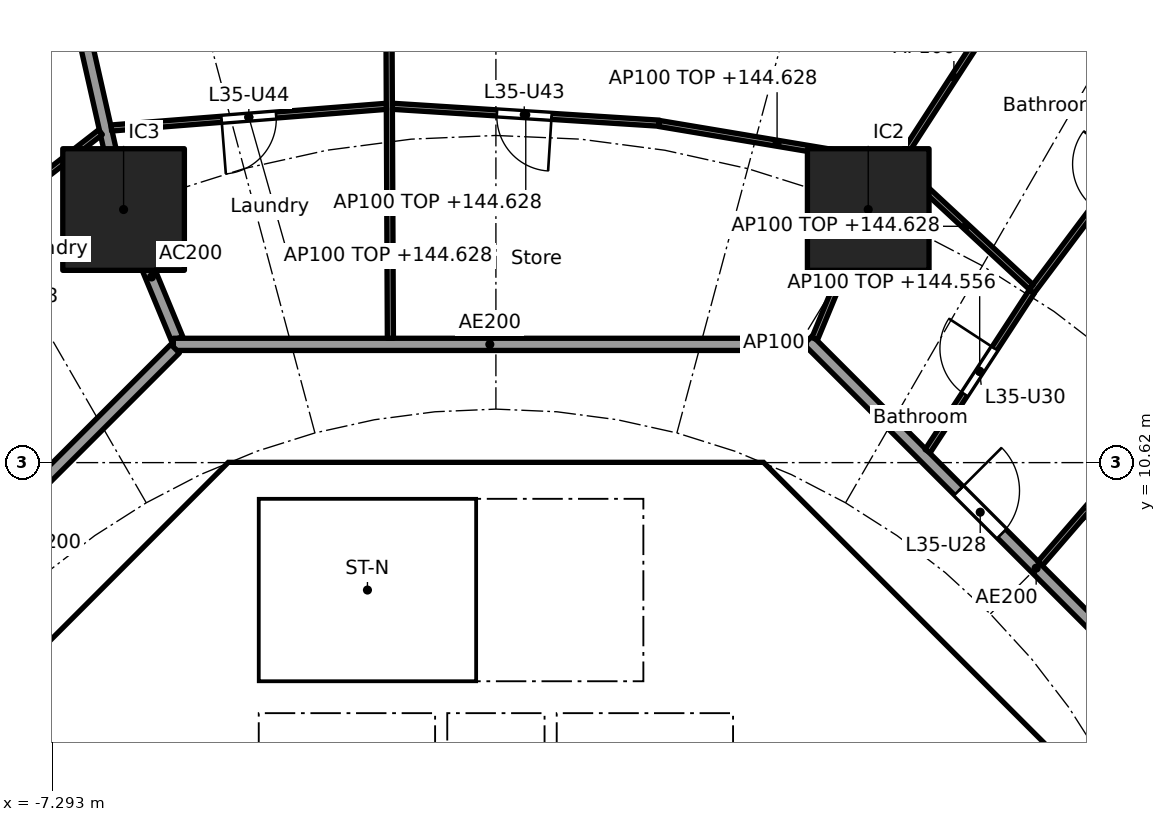
"""IFC4 building model, lengths in metres.
Left out: names, types, materials, properties, quantities, classifications, styles, units other than length and angle.
Written with IfcOpenShell. Run it as: python <this file> out.ifc"""

import sys

from ifc_helpers import new_model, si_unit, direction, frame, frame_2d, origin, origin_2d, place, context, subcontext, project, spatial, polyline, rectangle, outline, extrude, element, fill, save


model = new_model("IFC4")
c1 = context("Model", 3, precision=1e-05, world=origin(), true_north=direction((0.0, 1.0)))
c2 = subcontext(c1, "Body", "Model", "MODEL_VIEW")
j1 = project(units=[si_unit("LENGTHUNIT", "METRE"), si_unit("PLANEANGLEUNIT", "RADIAN")], contexts=[c1])
p1 = place(None, origin())
s1 = spatial("IfcSite", under=j1, at=p1, CompositionType="ELEMENT")
p2 = place(p1, origin())
s2 = spatial("IfcBuilding", under=s1, at=p2, CompositionType="ELEMENT")
p3 = place(p2, frame((0.0, 0.0, 141.8)))
s3 = spatial("IfcBuildingStorey", under=s2, at=p3, CompositionType="ELEMENT", Elevation=141.8)
for number, where, z_axis, x_axis in (
    (1, (6.123, 14.782, 0.0), (0.0, 0.0, 1.0), (1.0, 0.0, 0.0)),
    (2, (-6.123, 14.782, 0.0), (0.0, 0.0, 1.0), (1.0, 0.0, 0.0)),
):
    element("IfcColumn", number, at=place(p3, frame(where, z_axis=z_axis, x_axis=x_axis)), inside=s3, PredefinedType="COLUMN", context=c2, shape_type="SweptSolid", body=[
        extrude(rectangle(XDim=2.0, YDim=2.0, at=origin_2d()), origin(), (0.0, 0.0, 1.0), 3.7),
    ])
p4 = place(p3, frame((9.988, 4.613, 0.0), z_axis=(0.0, 0.0, 1.0), x_axis=(-0.707106781187, 0.707106781187, 0.0)))
e3 = element("IfcWall", 3, at=p4, inside=s3, PredefinedType="SHEAR", context=c2, shape_type="SweptSolid", body=[
    extrude(rectangle(XDim=7.602, YDim=0.6, at=frame_2d((3.801, 0.0))), origin(), (0.0, 0.0, 1.0), 3.44),
])
p5 = place(p4, frame((3.201, 0.0, 0.0)))
e4 = element("IfcOpeningElement", 4, at=p5, cuts=e3, PredefinedType="OPENING", context=c2, shape_type="SweptSolid", body=[
    extrude(rectangle(XDim=1.2, YDim=2.1, at=frame_2d((0.6, 1.05))), frame((0.0, 0.31, 0.0), z_axis=(0.0, -1.0, 0.0), x_axis=(1.0, 0.0, 0.0)), (0.0, 0.0, 1.0), 0.62),
])
p6 = place(p3, frame((-4.613, 9.988, 0.0), z_axis=(0.0, 0.0, 1.0), x_axis=(-0.707106781187, -0.707106781187, 0.0)))
e5 = element("IfcWall", 5, at=p6, inside=s3, PredefinedType="SHEAR", context=c2, shape_type="SweptSolid", body=[
    extrude(rectangle(XDim=7.602, YDim=0.6, at=frame_2d((3.801, 0.0))), origin(), (0.0, 0.0, 1.0), 3.44),
])
p7 = place(p6, frame((0.351, 0.0, 0.0)))
e6 = element("IfcOpeningElement", 6, at=p7, cuts=e5, PredefinedType="OPENING", context=c2, shape_type="SweptSolid", body=[
    extrude(rectangle(XDim=1.1, YDim=2.1, at=frame_2d((0.55, 1.05))), frame((0.0, 0.31, 0.0), z_axis=(0.0, -1.0, 0.0), x_axis=(1.0, 0.0, 0.0)), (0.0, 0.0, 1.0), 0.62),
])
p8 = place(p3, frame((-5.8, 4.3, 0.0), z_axis=(0.0, 0.0, 1.0), x_axis=(0.0, 1.0, 0.0)))
e7 = element("IfcWall", 7, at=p8, inside=s3, PredefinedType="PARTITIONING", context=c2, shape_type="SweptSolid", body=[
    extrude(rectangle(XDim=3.927, YDim=0.15, at=frame_2d((1.963, 0.0))), origin(), (0.0, 0.0, 1.0), 3.44),
])
p9 = place(p8, frame((0.413, 0.0, 0.0)))
e8 = element("IfcOpeningElement", 8, at=p9, cuts=e7, PredefinedType="OPENING", context=c2, shape_type="SweptSolid", body=[
    extrude(rectangle(XDim=0.9, YDim=2.1, at=frame_2d((0.45, 1.05))), frame((0.0, 0.085, 0.0), z_axis=(0.0, -1.0, 0.0), x_axis=(1.0, 0.0, 0.0)), (0.0, 0.0, 1.0), 0.17),
])
p10 = place(p8, frame((2.489, 0.0, 0.0)))
e9 = element("IfcOpeningElement", 9, at=p10, cuts=e7, PredefinedType="OPENING", context=c2, shape_type="SweptSolid", body=[
    extrude(rectangle(XDim=0.9, YDim=2.1, at=frame_2d((0.45, 1.05))), frame((0.0, 0.085, 0.0), z_axis=(0.0, -1.0, 0.0), x_axis=(1.0, 0.0, 0.0)), (0.0, 0.0, 1.0), 0.17),
])
p11 = place(p3, frame((4.0, 4.3, 0.0), z_axis=(0.0, 0.0, 1.0), x_axis=(0.0, 1.0, 0.0)))
e10 = element("IfcWall", 10, at=p11, inside=s3, PredefinedType="SOLIDWALL", context=c2, shape_type="SweptSolid", body=[
    extrude(rectangle(XDim=2.2, YDim=0.2, at=frame_2d((1.1, 0.0))), origin(), (0.0, 0.0, 1.0), 3.44),
])
p12 = place(p11, frame((0.55, 0.0, 0.0)))
e11 = element("IfcOpeningElement", 11, at=p12, cuts=e10, PredefinedType="OPENING", context=c2, shape_type="SweptSolid", body=[
    extrude(rectangle(XDim=1.1, YDim=2.1, at=frame_2d((0.55, 1.05))), frame((0.0, 0.11, 0.0), z_axis=(0.0, -1.0, 0.0), x_axis=(1.0, 0.0, 0.0)), (0.0, 0.0, 1.0), 0.22),
])
p13 = place(p3, frame((-4.0, 4.3, 0.0), z_axis=(0.0, 0.0, 1.0), x_axis=(0.0, 1.0, 0.0)))
e12 = element("IfcWall", 12, at=p13, inside=s3, PredefinedType="SOLIDWALL", context=c2, shape_type="SweptSolid", body=[
    extrude(rectangle(XDim=2.2, YDim=0.2, at=frame_2d((1.1, 0.0))), origin(), (0.0, 0.0, 1.0), 3.44),
])
p14 = place(p13, frame((0.55, 0.0, 0.0)))
e13 = element("IfcOpeningElement", 13, at=p14, cuts=e12, PredefinedType="OPENING", context=c2, shape_type="SweptSolid", body=[
    extrude(rectangle(XDim=1.1, YDim=2.1, at=frame_2d((0.55, 1.05))), frame((0.0, 0.11, 0.0), z_axis=(0.0, -1.0, 0.0), x_axis=(1.0, 0.0, 0.0)), (0.0, 0.0, 1.0), 0.22),
])
p15 = place(p3, frame((4.0, 7.025, 0.0), z_axis=(0.0, 0.0, 1.0), x_axis=(0.0, 1.0, 0.0)))
e14 = element("IfcWall", 14, at=p15, inside=s3, PredefinedType="SOLIDWALL", context=c2, shape_type="SweptSolid", body=[
    extrude(rectangle(XDim=3.0, YDim=0.2, at=frame_2d((1.5, 0.0))), origin(), (0.0, 0.0, 1.0), 3.44),
])
p16 = place(p15, frame((0.925, 0.0, 0.0)))
e15 = element("IfcOpeningElement", 15, at=p16, cuts=e14, PredefinedType="OPENING", context=c2, shape_type="SweptSolid", body=[
    extrude(rectangle(XDim=1.1, YDim=2.1, at=frame_2d((0.55, 1.05))), frame((0.0, 0.11, 0.0), z_axis=(0.0, -1.0, 0.0), x_axis=(1.0, 0.0, 0.0)), (0.0, 0.0, 1.0), 0.22),
])
p17 = place(p3, origin())
e16 = element("IfcWall", 16, at=p17, inside=s3, PredefinedType="SHEAR", context=c2, shape_type="SweptSolid", body=[
    extrude(outline(polyline([(-4.152, 10.025), (-4.401, 9.776), (-4.825, 10.2), (-4.401, 10.625), (4.401, 10.625), (4.825, 10.2), (4.401, 9.776), (4.152, 10.025), (-4.152, 10.025)])), origin(), (0.0, 0.0, 1.0), 3.44),
])
p18 = place(p3, frame((-8.001, 6.1, 0.0), z_axis=(0.0, 0.0, 1.0), x_axis=(1.0, 0.0, 0.0)))
e17 = element("IfcWall", 17, at=p18, inside=s3, PredefinedType="PARTITIONING", context=c2, shape_type="SweptSolid", body=[
    extrude(rectangle(XDim=2.126, YDim=0.15, at=frame_2d((1.063, 0.0))), origin(), (0.0, 0.0, 1.0), 3.44),
])
for number, where, z_axis, x_axis in (
    (18, (-0.9, 4.3, 0.0), (0.0, 0.0, 1.0), (0.0, 1.0, 0.0)),
    (19, (0.9, 4.3, 0.0), (0.0, 0.0, 1.0), (0.0, 1.0, 0.0)),
):
    element("IfcWall", number, at=place(p3, frame(where, z_axis=z_axis, x_axis=x_axis)), inside=s3, PredefinedType="SOLIDWALL", context=c2, shape_type="SweptSolid", body=[
        extrude(rectangle(XDim=2.2, YDim=0.2, at=frame_2d((1.1, 0.0))), origin(), (0.0, 0.0, 1.0), 3.44),
    ])
p19 = place(p3, origin())
e20 = element("IfcWall", 20, at=p19, inside=s3, PredefinedType="SOLIDWALL", context=c2, shape_type="SweptSolid", body=[
    extrude(outline(polyline([(-3.9, 7.025), (-4.1, 7.025), (-4.1, 10.025), (-3.9, 10.025), (-3.9, 7.025)])), origin(), (0.0, 0.0, 1.0), 3.44),
])
p20 = place(p3, origin())
e21 = element("IfcWall", 21, at=p20, inside=s3, PredefinedType="SOLIDWALL", context=c2, shape_type="SweptSolid", body=[
    extrude(outline(polyline([(4.1, 6.5), (-4.1, 6.5), (-4.1, 7.025), (4.1, 7.025), (4.1, 6.5)])), origin(), (0.0, 0.0, 1.0), 3.44),
])
p21 = place(p3, frame((-5.243, 12.657, 0.0), z_axis=(0.0, 0.0, 1.0), x_axis=(-0.38273085373, 0.923859888513, 0.0)))
e22 = element("IfcWall", 22, at=p21, inside=s3, PredefinedType="PARTITIONING", context=c2, shape_type="SweptSolid", body=[
    extrude(rectangle(XDim=2.199, YDim=0.2, at=frame_2d((1.1, 0.0))), origin(), (0.0, 0.0, 1.0), 3.44),
])
p22 = place(p3, frame((-6.134, 14.831, 0.0), z_axis=(0.0, 0.0, 1.0), x_axis=(-0.220337590808, 0.975423675167, 0.0)))
e23 = element("IfcWall", 23, at=p22, inside=s3, PredefinedType="PARTITIONING", context=c2, shape_type="SweptSolid", body=[
    extrude(rectangle(XDim=10.451, YDim=0.2, at=frame_2d((5.226, 0.0))), origin(), (0.0, 0.0, 1.0), 2.828),
])
p23 = place(p3, frame((12.635, 5.134, 0.0), z_axis=(0.0, 0.0, 1.0), x_axis=(-0.707106781187, 0.707106781187, 0.0)))
e24 = element("IfcWall", 24, at=p23, inside=s3, PredefinedType="PARTITIONING", context=c2, shape_type="SweptSolid", body=[
    extrude(rectangle(XDim=10.609, YDim=0.2, at=frame_2d((5.305, 0.0))), origin(), (0.0, 0.0, 1.0), 3.44),
])
p24 = place(p23, frame((6.106, 0.0, 0.0)))
e25 = element("IfcOpeningElement", 25, at=p24, cuts=e24, PredefinedType="OPENING", context=c2, shape_type="SweptSolid", body=[
    extrude(rectangle(XDim=1.0, YDim=2.1, at=frame_2d((0.5, 1.05))), frame((0.0, 0.11, 0.0), z_axis=(0.0, -1.0, 0.0), x_axis=(1.0, 0.0, 0.0)), (0.0, 0.0, 1.0), 0.22),
])
p25 = place(p3, frame((5.104, 12.565, 0.0), z_axis=(0.0, 0.0, 1.0), x_axis=(-1.0, 0.0, 0.0)))
e26 = element("IfcWall", 26, at=p25, inside=s3, PredefinedType="PARTITIONING", context=c2, shape_type="SweptSolid", body=[
    extrude(rectangle(XDim=10.409, YDim=0.2, at=frame_2d((5.205, 0.0))), origin(), (0.0, 0.0, 1.0), 3.44),
])
p26 = place(p3, frame((-5.275, 12.494, 0.0), z_axis=(0.0, 0.0, 1.0), x_axis=(-0.707106781187, -0.707106781187, 0.0)))
e27 = element("IfcWall", 27, at=p26, inside=s3, PredefinedType="PARTITIONING", context=c2, shape_type="SweptSolid", body=[
    extrude(rectangle(XDim=10.209, YDim=0.2, at=frame_2d((5.104, 0.0))), origin(), (0.0, 0.0, 1.0), 3.44),
])
p27 = place(p26, frame((4.604, 0.0, 0.0)))
e28 = element("IfcOpeningElement", 28, at=p27, cuts=e27, PredefinedType="OPENING", context=c2, shape_type="SweptSolid", body=[
    extrude(rectangle(XDim=1.0, YDim=2.1, at=frame_2d((0.5, 1.05))), frame((0.0, 0.11, 0.0), z_axis=(0.0, -1.0, 0.0), x_axis=(1.0, 0.0, 0.0)), (0.0, 0.0, 1.0), 0.22),
])
p28 = place(p3, frame((8.95, 8.96, 0.0), z_axis=(0.0, 0.0, 1.0), x_axis=(0.653829477183, 0.756641932995, 0.0)))
e29 = element("IfcWall", 29, at=p28, inside=s3, PredefinedType="PARTITIONING", context=c2, shape_type="SweptSolid", body=[
    extrude(rectangle(XDim=7.611, YDim=0.1, at=frame_2d((3.805, 0.0))), origin(), (0.0, 0.0, 1.0), 2.756),
])
p29 = place(p28, frame((1.168, 0.0, 0.0)))
e30 = element("IfcOpeningElement", 30, at=p29, cuts=e29, PredefinedType="OPENING", context=c2, shape_type="SweptSolid", body=[
    extrude(rectangle(XDim=0.9, YDim=2.1, at=frame_2d((0.45, 1.05))), frame((0.0, 0.06, 0.0), z_axis=(0.0, -1.0, 0.0), x_axis=(1.0, 0.0, 0.0)), (0.0, 0.0, 1.0), 0.12),
])
p30 = place(p28, frame((4.948, 0.0, 0.0)))
e31 = element("IfcOpeningElement", 31, at=p30, cuts=e29, PredefinedType="OPENING", context=c2, shape_type="SweptSolid", body=[
    extrude(rectangle(XDim=0.9, YDim=2.1, at=frame_2d((0.45, 1.05))), frame((0.0, 0.06, 0.0), z_axis=(0.0, -1.0, 0.0), x_axis=(1.0, 0.0, 0.0)), (0.0, 0.0, 1.0), 0.12),
])
p31 = place(p3, frame((13.856, 14.714, 0.0), z_axis=(0.0, 0.0, 1.0), x_axis=(-0.743793479211, 0.668409500444, 0.0)))
e32 = element("IfcWall", 32, at=p31, inside=s3, PredefinedType="PARTITIONING", context=c2, shape_type="SweptSolid", body=[
    extrude(rectangle(XDim=6.659, YDim=0.1, at=frame_2d((3.329, 0.0))), origin(), (0.0, 0.0, 1.0), 2.828),
])
p32 = place(p31, frame((1.19, 0.0, 0.0)))
e33 = element("IfcOpeningElement", 33, at=p32, cuts=e32, PredefinedType="OPENING", context=c2, shape_type="SweptSolid", body=[
    extrude(rectangle(XDim=0.9, YDim=2.1, at=frame_2d((0.45, 1.05))), frame((0.0, 0.06, 0.0), z_axis=(0.0, -1.0, 0.0), x_axis=(1.0, 0.0, 0.0)), (0.0, 0.0, 1.0), 0.12),
])
p33 = place(p3, frame((7.099, 10.808, 0.0), z_axis=(0.0, 0.0, 1.0), x_axis=(0.546709757921, 0.837322184463, 0.0)))
e34 = element("IfcWall", 34, at=p33, inside=s3, PredefinedType="PARTITIONING", context=c2, shape_type="SweptSolid", body=[
    extrude(rectangle(XDim=3.134, YDim=0.1, at=frame_2d((1.567, 0.0))), origin(), (0.0, 0.0, 1.0), 2.756),
])
p34 = place(p33, frame((1.117, 0.0, 0.0)))
e35 = element("IfcOpeningElement", 35, at=p34, cuts=e34, PredefinedType="OPENING", context=c2, shape_type="SweptSolid", body=[
    extrude(rectangle(XDim=0.9, YDim=2.1, at=frame_2d((0.45, 1.05))), frame((0.0, 0.06, 0.0), z_axis=(0.0, -1.0, 0.0), x_axis=(1.0, 0.0, 0.0)), (0.0, 0.0, 1.0), 0.12),
])
p35 = place(p3, frame((8.81, 13.434, 0.0), z_axis=(0.0, 0.0, 1.0), x_axis=(0.600491337497, 0.799631261014, 0.0)))
e36 = element("IfcWall", 36, at=p35, inside=s3, PredefinedType="PARTITIONING", context=c2, shape_type="SweptSolid", body=[
    extrude(rectangle(XDim=4.292, YDim=0.1, at=frame_2d((2.146, 0.0))), origin(), (0.0, 0.0, 1.0), 3.44),
])
p36 = place(p35, frame((1.721, 0.0, 0.0)))
e37 = element("IfcOpeningElement", 37, at=p36, cuts=e36, PredefinedType="OPENING", context=c2, shape_type="SweptSolid", body=[
    extrude(rectangle(XDim=0.9, YDim=2.1, at=frame_2d((0.45, 1.05))), frame((0.0, 0.06, 0.0), z_axis=(0.0, -1.0, 0.0), x_axis=(1.0, 0.0, 0.0)), (0.0, 0.0, 1.0), 0.12),
])
p37 = place(p3, frame((8.803, 13.508, 0.0), z_axis=(0.0, 0.0, 1.0), x_axis=(-0.733130973758, 0.680087476224, 0.0)))
e38 = element("IfcWall", 38, at=p37, inside=s3, PredefinedType="PARTITIONING", context=c2, shape_type="SweptSolid", body=[
    extrude(rectangle(XDim=2.937, YDim=0.1, at=frame_2d((1.468, 0.0))), origin(), (0.0, 0.0, 1.0), 2.828),
])
p38 = place(p3, frame((5.243, 12.657, 0.0), z_axis=(0.0, 0.0, 1.0), x_axis=(0.382703272338, 0.923871314276, 0.0)))
e39 = element("IfcWall", 39, at=p38, inside=s3, PredefinedType="PARTITIONING", context=c2, shape_type="SweptSolid", body=[
    extrude(rectangle(XDim=2.249, YDim=0.1, at=frame_2d((1.125, 0.0))), origin(), (0.0, 0.0, 1.0), 3.44),
])
p39 = place(p3, frame((6.15, 14.824, 0.0), z_axis=(0.0, 0.0, 1.0), x_axis=(0.543711280797, 0.839272329542, 0.0)))
e40 = element("IfcWall", 40, at=p39, inside=s3, PredefinedType="PARTITIONING", context=c2, shape_type="SweptSolid", body=[
    extrude(rectangle(XDim=5.083, YDim=0.1, at=frame_2d((2.541, 0.0))), origin(), (0.0, 0.0, 1.0), 3.44),
])
p40 = place(p3, frame((6.564, 15.547, 0.0), z_axis=(0.0, 0.0, 1.0), x_axis=(-0.986269521186, 0.165143669511, 0.0)))
e41 = element("IfcWall", 41, at=p40, inside=s3, PredefinedType="PARTITIONING", context=c2, shape_type="SweptSolid", body=[
    extrude(rectangle(XDim=3.934, YDim=0.1, at=frame_2d((1.967, 0.0))), origin(), (0.0, 0.0, 1.0), 2.828),
])
p41 = place(p3, frame((2.685, 16.202, 0.0), z_axis=(0.0, 0.0, 1.0), x_axis=(-0.998000808042, 0.063201164138, 0.0)))
e42 = element("IfcWall", 42, at=p41, inside=s3, PredefinedType="PARTITIONING", context=c2, shape_type="SweptSolid", body=[
    extrude(rectangle(XDim=4.396, YDim=0.1, at=frame_2d((2.198, 0.0))), origin(), (0.0, 0.0, 1.0), 2.828),
])
p42 = place(p41, frame((1.773, 0.0, 0.0)))
e43 = element("IfcOpeningElement", 43, at=p42, cuts=e42, PredefinedType="OPENING", context=c2, shape_type="SweptSolid", body=[
    extrude(rectangle(XDim=0.9, YDim=2.1, at=frame_2d((0.45, 1.05))), frame((0.0, 0.06, 0.0), z_axis=(0.0, -1.0, 0.0), x_axis=(1.0, 0.0, 0.0)), (0.0, 0.0, 1.0), 0.12),
])
p43 = place(p3, frame((-1.735, 12.665, 0.0), z_axis=(0.0, 0.0, 1.0), x_axis=(-0.004494500855, 0.99998989968, 0.0)))
e44 = element("IfcWall", 44, at=p43, inside=s3, PredefinedType="PARTITIONING", context=c2, shape_type="SweptSolid", body=[
    extrude(rectangle(XDim=13.363, YDim=0.1, at=frame_2d((6.681, 0.0))), origin(), (0.0, 0.0, 1.0), 2.756),
])
p44 = place(p43, frame((5.908, 0.0, 0.0)))
e45 = element("IfcOpeningElement", 45, at=p44, cuts=e44, PredefinedType="OPENING", context=c2, shape_type="SweptSolid", body=[
    extrude(rectangle(XDim=0.9, YDim=2.1, at=frame_2d((0.45, 1.05))), frame((0.0, 0.06, 0.0), z_axis=(0.0, -1.0, 0.0), x_axis=(1.0, 0.0, 0.0)), (0.0, 0.0, 1.0), 0.12),
])
p45 = place(p3, frame((-1.802, 16.479, 0.0), z_axis=(0.0, 0.0, 1.0), x_axis=(-0.996907698294, -0.078581429625, 0.0)))
e46 = element("IfcWall", 46, at=p45, inside=s3, PredefinedType="PARTITIONING", context=c2, shape_type="SweptSolid", body=[
    extrude(rectangle(XDim=4.536, YDim=0.1, at=frame_2d((2.268, 0.0))), origin(), (0.0, 0.0, 1.0), 2.828),
])
p46 = place(p45, frame((1.818, 0.0, 0.0)))
e47 = element("IfcOpeningElement", 47, at=p46, cuts=e46, PredefinedType="OPENING", context=c2, shape_type="SweptSolid", body=[
    extrude(rectangle(XDim=0.9, YDim=2.1, at=frame_2d((0.45, 1.05))), frame((0.0, 0.06, 0.0), z_axis=(0.0, -1.0, 0.0), x_axis=(1.0, 0.0, 0.0)), (0.0, 0.0, 1.0), 0.12),
])
p47 = place(p3, frame((-6.503, 16.054, 0.0), z_axis=(0.0, 0.0, 1.0), x_axis=(-0.789428807693, -0.613842127574, 0.0)))
e48 = element("IfcWall", 48, at=p47, inside=s3, PredefinedType="PARTITIONING", context=c2, shape_type="SweptSolid", body=[
    extrude(rectangle(XDim=3.948, YDim=0.1, at=frame_2d((1.974, 0.0))), origin(), (0.0, 0.0, 1.0), 2.828),
])
p48 = place(p16, origin())
e49 = element("IfcDoor", 49, at=p48, inside=s3, OperationType="SINGLE_SWING_LEFT", PredefinedType="DOOR", context=c2, shape_type="SweptSolid", body=[
    extrude(rectangle(XDim=1.1, YDim=2.1, at=frame_2d((0.55, 1.05))), frame((0.0, 0.025, 0.0), z_axis=(0.0, -1.0, 0.0), x_axis=(1.0, 0.0, 0.0)), (0.0, 0.0, 1.0), 0.05),
])
fill(e15, e49)
p49 = place(p10, origin())
e50 = element("IfcDoor", 50, at=p49, inside=s3, OperationType="SINGLE_SWING_RIGHT", PredefinedType="DOOR", context=c2, shape_type="SweptSolid", body=[
    extrude(rectangle(XDim=0.9, YDim=2.1, at=frame_2d((0.45, 1.05))), frame((0.0, 0.025, 0.0), z_axis=(0.0, -1.0, 0.0), x_axis=(1.0, 0.0, 0.0)), (0.0, 0.0, 1.0), 0.05),
])
fill(e9, e50)
p50 = place(p5, origin())
e51 = element("IfcDoor", 51, at=p50, inside=s3, OperationType="SINGLE_SWING_RIGHT", PredefinedType="DOOR", context=c2, shape_type="SweptSolid", body=[
    extrude(rectangle(XDim=1.2, YDim=2.1, at=frame_2d((0.6, 1.05))), frame((0.0, 0.025, 0.0), z_axis=(0.0, -1.0, 0.0), x_axis=(1.0, 0.0, 0.0)), (0.0, 0.0, 1.0), 0.05),
])
fill(e4, e51)
p51 = place(p7, origin())
e52 = element("IfcDoor", 52, at=p51, inside=s3, OperationType="SINGLE_SWING_RIGHT", PredefinedType="DOOR", context=c2, shape_type="SweptSolid", body=[
    extrude(rectangle(XDim=1.1, YDim=2.1, at=frame_2d((0.55, 1.05))), frame((0.0, 0.025, 0.0), z_axis=(0.0, -1.0, 0.0), x_axis=(1.0, 0.0, 0.0)), (0.0, 0.0, 1.0), 0.05),
])
fill(e6, e52)
p52 = place(p24, frame((1.0, 0.0, 0.0), x_axis=(-1.0, 0.0, 0.0)))
e53 = element("IfcDoor", 53, at=p52, inside=s3, OperationType="SINGLE_SWING_LEFT", PredefinedType="DOOR", context=c2, shape_type="SweptSolid", body=[
    extrude(rectangle(XDim=1.0, YDim=2.1, at=frame_2d((0.5, 1.05))), frame((0.0, 0.025, 0.0), z_axis=(0.0, -1.0, 0.0), x_axis=(1.0, 0.0, 0.0)), (0.0, 0.0, 1.0), 0.05),
])
fill(e25, e53)
p53 = place(p29, frame((0.9, 0.0, 0.0), x_axis=(-1.0, 0.0, 0.0)))
e54 = element("IfcDoor", 54, at=p53, inside=s3, OperationType="SINGLE_SWING_RIGHT", PredefinedType="DOOR", context=c2, shape_type="SweptSolid", body=[
    extrude(rectangle(XDim=0.9, YDim=2.1, at=frame_2d((0.45, 1.05))), frame((0.0, 0.025, 0.0), z_axis=(0.0, -1.0, 0.0), x_axis=(1.0, 0.0, 0.0)), (0.0, 0.0, 1.0), 0.05),
])
fill(e30, e54)
p54 = place(p34, origin())
e55 = element("IfcDoor", 55, at=p54, inside=s3, OperationType="SINGLE_SWING_RIGHT", PredefinedType="DOOR", context=c2, shape_type="SweptSolid", body=[
    extrude(rectangle(XDim=0.9, YDim=2.1, at=frame_2d((0.45, 1.05))), frame((0.0, 0.025, 0.0), z_axis=(0.0, -1.0, 0.0), x_axis=(1.0, 0.0, 0.0)), (0.0, 0.0, 1.0), 0.05),
])
fill(e35, e55)
p55 = place(p42, origin())
e56 = element("IfcDoor", 56, at=p55, inside=s3, OperationType="SINGLE_SWING_LEFT", PredefinedType="DOOR", context=c2, shape_type="SweptSolid", body=[
    extrude(rectangle(XDim=0.9, YDim=2.1, at=frame_2d((0.45, 1.05))), frame((0.0, 0.025, 0.0), z_axis=(0.0, -1.0, 0.0), x_axis=(1.0, 0.0, 0.0)), (0.0, 0.0, 1.0), 0.05),
])
fill(e43, e56)
p56 = place(p46, origin())
e57 = element("IfcDoor", 57, at=p56, inside=s3, OperationType="SINGLE_SWING_RIGHT", PredefinedType="DOOR", context=c2, shape_type="SweptSolid", body=[
    extrude(rectangle(XDim=0.9, YDim=2.1, at=frame_2d((0.45, 1.05))), frame((0.0, 0.025, 0.0), z_axis=(0.0, -1.0, 0.0), x_axis=(1.0, 0.0, 0.0)), (0.0, 0.0, 1.0), 0.05),
])
fill(e47, e57)
save(model, sys.argv[1])
